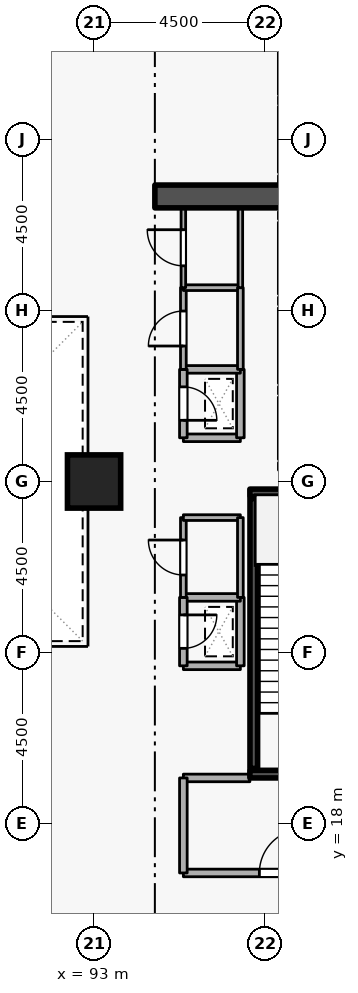
"""IFC4 building model, lengths in metres.
Left out: names, types, materials, properties, quantities, classifications, styles, units other than length and angle.
Written with IfcOpenShell. Run it as: python <this file> out.ifc"""

import sys

from ifc_helpers import new_model, si_unit, direction, frame, frame_2d, origin, origin_2d, place, context, subcontext, project, spatial, rectangle, extrude, element, fill, save


model = new_model("IFC4")
c1 = context("Model", 3, precision=1e-05, world=origin(), true_north=direction((0.0, 1.0)))
c2 = subcontext(c1, "Body", "Model", "MODEL_VIEW")
j1 = project(units=[si_unit("LENGTHUNIT", "METRE"), si_unit("PLANEANGLEUNIT", "RADIAN")], contexts=[c1])
p1 = place(None, origin())
s1 = spatial("IfcSite", under=j1, at=p1, CompositionType="ELEMENT")
p2 = place(p1, origin())
s2 = spatial("IfcBuilding", under=s1, at=p2, CompositionType="ELEMENT")
p3 = place(p2, frame((0.0, 0.0, 4.8)))
s3 = spatial("IfcBuildingStorey", under=s2, at=p3, CompositionType="ELEMENT", Elevation=4.8)
p4 = place(p3, frame((94.6, 34.5, 0.0), z_axis=(0.0, 0.0, 1.0), x_axis=(1.0, 0.0, 0.0)))
e1 = element("IfcWall", 1, at=p4, inside=s3, PredefinedType="SHEAR", context=c2, shape_type="SweptSolid", body=[
    extrude(rectangle(XDim=5.7, YDim=0.6, at=frame_2d((2.85, 0.0))), origin(), (0.0, 0.0, 1.0), 4.8),
])
p5 = place(p3, frame((93.0, 27.0, 0.0), z_axis=(0.0, 0.0, 1.0), x_axis=(1.0, 0.0, 0.0)))
e2 = element("IfcColumn", 2, at=p5, inside=s3, PredefinedType="COLUMN", context=c2, shape_type="SweptSolid", body=[
    extrude(rectangle(XDim=1.4, YDim=1.4, at=origin_2d()), origin(), (0.0, 0.0, 1.0), 4.8),
])
p6 = place(p3, frame((97.95, 29.22, 0.0), z_axis=(0.0, 0.0, 1.0), x_axis=(0.0, -1.0, 0.0)))
e3 = element("IfcWall", 3, at=p6, inside=s3, PredefinedType="STANDARD", context=c2, shape_type="SweptSolid", body=[
    extrude(rectangle(XDim=1.64, YDim=0.2, at=frame_2d((0.82, 0.0))), origin(), (0.0, 0.0, 1.0), 4.46),
])
p7 = place(p6, frame((0.31, 0.0, 0.0)))
e4 = element("IfcOpeningElement", 4, at=p7, cuts=e3, PredefinedType="OPENING", context=c2, shape_type="SweptSolid", body=[
    extrude(rectangle(XDim=1.02, YDim=2.06, at=frame_2d((0.51, 1.03))), frame((0.0, 0.11, 0.0), z_axis=(0.0, -1.0, 0.0), x_axis=(1.0, 0.0, 0.0)), (0.0, 0.0, 1.0), 0.22),
])
p8 = place(p3, frame((97.95, 31.57, 0.0), z_axis=(0.0, 0.0, 1.0), x_axis=(0.0, -1.0, 0.0)))
e5 = element("IfcWall", 5, at=p8, inside=s3, PredefinedType="STANDARD", context=c2, shape_type="SweptSolid", body=[
    extrude(rectangle(XDim=1.99, YDim=0.2, at=frame_2d((0.995, 0.0))), origin(), (0.0, 0.0, 1.0), 4.46),
])
p9 = place(p3, frame((97.95, 33.82, 0.0), z_axis=(0.0, 0.0, 1.0), x_axis=(0.0, -1.0, 0.0)))
e6 = element("IfcWall", 6, at=p9, inside=s3, PredefinedType="STANDARD", context=c2, shape_type="SweptSolid", body=[
    extrude(rectangle(XDim=1.89, YDim=0.2, at=frame_2d((0.945, 0.0))), origin(), (0.0, 0.0, 1.0), 4.46),
])
p10 = place(p9, frame((0.435, 0.0, 0.0)))
e7 = element("IfcOpeningElement", 7, at=p10, cuts=e6, PredefinedType="OPENING", context=c2, shape_type="SweptSolid", body=[
    extrude(rectangle(XDim=1.02, YDim=2.06, at=frame_2d((0.51, 1.03))), frame((0.0, 0.11, 0.0), z_axis=(0.0, -1.0, 0.0), x_axis=(1.0, 0.0, 0.0)), (0.0, 0.0, 1.0), 0.22),
])
p11 = place(p3, frame((97.95, 36.87, 0.0), z_axis=(0.0, 0.0, 1.0), x_axis=(0.0, -1.0, 0.0)))
e8 = element("IfcWall", 8, at=p11, inside=s3, PredefinedType="STANDARD", context=c2, shape_type="SweptSolid", body=[
    extrude(rectangle(XDim=1.74, YDim=0.2, at=frame_2d((0.87, 0.0))), origin(), (0.0, 0.0, 1.0), 4.46),
])
p12 = place(p11, frame((0.36, 0.0, 0.0)))
e9 = element("IfcOpeningElement", 9, at=p12, cuts=e8, PredefinedType="OPENING", context=c2, shape_type="SweptSolid", body=[
    extrude(rectangle(XDim=1.02, YDim=2.06, at=frame_2d((0.51, 1.03))), frame((0.0, 0.11, 0.0), z_axis=(0.0, -1.0, 0.0), x_axis=(1.0, 0.0, 0.0)), (0.0, 0.0, 1.0), 0.22),
])
p13 = place(p3, frame((97.95, 38.97, 0.0), z_axis=(0.0, 0.0, 1.0), x_axis=(0.0, -1.0, 0.0)))
e10 = element("IfcWall", 10, at=p13, inside=s3, PredefinedType="STANDARD", context=c2, shape_type="SweptSolid", body=[
    extrude(rectangle(XDim=1.79, YDim=0.2, at=frame_2d((0.895, 0.0))), origin(), (0.0, 0.0, 1.0), 4.46),
])
p14 = place(p13, frame((0.385, 0.0, 0.0)))
e11 = element("IfcOpeningElement", 11, at=p14, cuts=e10, PredefinedType="OPENING", context=c2, shape_type="SweptSolid", body=[
    extrude(rectangle(XDim=1.02, YDim=2.06, at=frame_2d((0.51, 1.03))), frame((0.0, 0.11, 0.0), z_axis=(0.0, -1.0, 0.0), x_axis=(1.0, 0.0, 0.0)), (0.0, 0.0, 1.0), 0.22),
])
p15 = place(p3, frame((100.45, 19.3, 0.0), z_axis=(0.0, 0.0, 1.0), x_axis=(-1.0, 0.0, 0.0)))
e12 = element("IfcWall", 12, at=p15, inside=s3, PredefinedType="SHEAR", context=c2, shape_type="SweptSolid", body=[
    extrude(rectangle(XDim=3.35, YDim=0.2, at=frame_2d((1.675, 0.0))), origin(), (0.0, 0.0, 1.0), 4.8),
])
p16 = place(p15, frame((1.125, 0.0, 0.0)))
e13 = element("IfcOpeningElement", 13, at=p16, cuts=e12, PredefinedType="OPENING", context=c2, shape_type="SweptSolid", body=[
    extrude(rectangle(XDim=1.1, YDim=2.1, at=frame_2d((0.55, 1.05))), frame((0.0, 0.11, 0.0), z_axis=(0.0, -1.0, 0.0), x_axis=(1.0, 0.0, 0.0)), (0.0, 0.0, 1.0), 0.22),
])
p17 = place(p3, frame((97.1, 26.7, 0.0), z_axis=(0.0, 0.0, 1.0), x_axis=(1.0, 0.0, 0.0)))
e14 = element("IfcWall", 14, at=p17, inside=s3, PredefinedType="SHEAR", context=c2, shape_type="SweptSolid", body=[
    extrude(rectangle(XDim=3.35, YDim=0.2, at=frame_2d((1.675, 0.0))), origin(), (0.0, 0.0, 1.0), 4.8),
])
p18 = place(p3, frame((97.203, 26.55, 0.0), z_axis=(0.0, 0.0, 1.0), x_axis=(0.0, -1.0, 0.0)))
e15 = element("IfcWall", 15, at=p18, inside=s3, PredefinedType="SHEAR", context=c2, shape_type="SweptSolid", body=[
    extrude(rectangle(XDim=7.1, YDim=0.2, at=frame_2d((3.55, 0.0))), origin(), (0.0, 0.0, 1.0), 4.8),
])
p19 = place(p3, frame((95.35, 16.7, 0.0), z_axis=(0.0, 0.0, 1.0), x_axis=(1.0, 0.0, 0.0)))
e16 = element("IfcWall", 16, at=p19, inside=s3, PredefinedType="STANDARD", context=c2, shape_type="SweptSolid", body=[
    extrude(rectangle(XDim=5.15, YDim=0.2, at=frame_2d((2.575, 0.0))), origin(), (0.0, 0.0, 1.0), 4.46),
])
p20 = place(p19, frame((2.0, 0.0, 0.0)))
e17 = element("IfcOpeningElement", 17, at=p20, cuts=e16, PredefinedType="OPENING", context=c2, shape_type="SweptSolid", body=[
    extrude(rectangle(XDim=1.15, YDim=2.1, at=frame_2d((0.575, 1.05))), frame((0.0, 0.11, 0.0), z_axis=(0.0, -1.0, 0.0), x_axis=(1.0, 0.0, 0.0)), (0.0, 0.0, 1.0), 0.22),
])
p21 = place(p3, frame((97.1, 19.2, 0.0), z_axis=(0.0, 0.0, 1.0), x_axis=(-1.0, 0.0, 0.0)))
e18 = element("IfcWall", 18, at=p21, inside=s3, PredefinedType="STANDARD", context=c2, shape_type="SweptSolid", body=[
    extrude(rectangle(XDim=1.75, YDim=0.2, at=frame_2d((0.875, 0.0))), origin(), (0.0, 0.0, 1.0), 3.665),
])
p22 = place(p3, frame((95.35, 19.2, 0.0), z_axis=(0.0, 0.0, 1.0), x_axis=(0.0, -1.0, 0.0)))
e19 = element("IfcWall", 19, at=p22, inside=s3, PredefinedType="STANDARD", context=c2, shape_type="SweptSolid", body=[
    extrude(rectangle(XDim=2.5, YDim=0.2, at=frame_2d((1.25, 0.0))), origin(), (0.0, 0.0, 1.0), 4.46),
])
p23 = place(p3, frame((95.35, 28.15, 0.0), z_axis=(0.0, 0.0, 1.0), x_axis=(1.0, 0.0, 0.0)))
e20 = element("IfcWall", 20, at=p23, inside=s3, PredefinedType="STANDARD", context=c2, shape_type="SweptSolid", body=[
    extrude(rectangle(XDim=1.5, YDim=0.2, at=frame_2d((0.75, 0.0))), origin(), (0.0, 0.0, 1.0), 4.46),
])
p24 = place(p3, frame((96.85, 28.15, 0.0), z_axis=(0.0, 0.0, 1.0), x_axis=(0.0, 1.0, 0.0)))
e21 = element("IfcWall", 21, at=p24, inside=s3, PredefinedType="STANDARD", context=c2, shape_type="SweptSolid", body=[
    extrude(rectangle(XDim=1.8, YDim=0.2, at=frame_2d((0.9, 0.0))), origin(), (0.0, 0.0, 1.0), 4.46),
])
p25 = place(p3, frame((96.85, 29.95, 0.0), z_axis=(0.0, 0.0, 1.0), x_axis=(-1.0, 0.0, 0.0)))
e22 = element("IfcWall", 22, at=p25, inside=s3, PredefinedType="STANDARD", context=c2, shape_type="SweptSolid", body=[
    extrude(rectangle(XDim=1.5, YDim=0.2, at=frame_2d((0.75, 0.0))), origin(), (0.0, 0.0, 1.0), 4.46),
])
p26 = place(p3, frame((95.35, 29.95, 0.0), z_axis=(0.0, 0.0, 1.0), x_axis=(0.0, -1.0, 0.0)))
e23 = element("IfcWall", 23, at=p26, inside=s3, PredefinedType="STANDARD", context=c2, shape_type="SweptSolid", body=[
    extrude(rectangle(XDim=1.8, YDim=0.2, at=frame_2d((0.9, 0.0))), origin(), (0.0, 0.0, 1.0), 4.46),
])
p27 = place(p26, frame((0.46, 0.0, 0.0)))
e24 = element("IfcOpeningElement", 24, at=p27, cuts=e23, PredefinedType="OPENING", context=c2, shape_type="SweptSolid", body=[
    extrude(rectangle(XDim=0.88, YDim=2.04, at=frame_2d((0.44, 1.02))), frame((0.0, 0.11, 0.0), z_axis=(0.0, -1.0, 0.0), x_axis=(1.0, 0.0, 0.0)), (0.0, 0.0, 1.0), 0.22),
])
p28 = place(p3, frame((95.35, 22.15, 0.0), z_axis=(0.0, 0.0, 1.0), x_axis=(1.0, 0.0, 0.0)))
e25 = element("IfcWall", 25, at=p28, inside=s3, PredefinedType="STANDARD", context=c2, shape_type="SweptSolid", body=[
    extrude(rectangle(XDim=1.5, YDim=0.2, at=frame_2d((0.75, 0.0))), origin(), (0.0, 0.0, 1.0), 4.46),
])
p29 = place(p3, frame((96.85, 22.15, 0.0), z_axis=(0.0, 0.0, 1.0), x_axis=(0.0, 1.0, 0.0)))
e26 = element("IfcWall", 26, at=p29, inside=s3, PredefinedType="STANDARD", context=c2, shape_type="SweptSolid", body=[
    extrude(rectangle(XDim=1.8, YDim=0.2, at=frame_2d((0.9, 0.0))), origin(), (0.0, 0.0, 1.0), 4.46),
])
p30 = place(p3, frame((96.85, 23.95, 0.0), z_axis=(0.0, 0.0, 1.0), x_axis=(-1.0, 0.0, 0.0)))
e27 = element("IfcWall", 27, at=p30, inside=s3, PredefinedType="STANDARD", context=c2, shape_type="SweptSolid", body=[
    extrude(rectangle(XDim=1.5, YDim=0.2, at=frame_2d((0.75, 0.0))), origin(), (0.0, 0.0, 1.0), 4.46),
])
p31 = place(p3, frame((95.35, 23.95, 0.0), z_axis=(0.0, 0.0, 1.0), x_axis=(0.0, -1.0, 0.0)))
e28 = element("IfcWall", 28, at=p31, inside=s3, PredefinedType="STANDARD", context=c2, shape_type="SweptSolid", body=[
    extrude(rectangle(XDim=1.8, YDim=0.2, at=frame_2d((0.9, 0.0))), origin(), (0.0, 0.0, 1.0), 4.46),
])
p32 = place(p31, frame((0.46, 0.0, 0.0)))
e29 = element("IfcOpeningElement", 29, at=p32, cuts=e28, PredefinedType="OPENING", context=c2, shape_type="SweptSolid", body=[
    extrude(rectangle(XDim=0.88, YDim=2.04, at=frame_2d((0.44, 1.02))), frame((0.0, 0.11, 0.0), z_axis=(0.0, -1.0, 0.0), x_axis=(1.0, 0.0, 0.0)), (0.0, 0.0, 1.0), 0.22),
])
p33 = place(p3, frame((95.35, 23.95, 0.0), z_axis=(0.0, 0.0, 1.0), x_axis=(0.0, 1.0, 0.0)))
e30 = element("IfcWall", 30, at=p33, inside=s3, PredefinedType="PARTITIONING", context=c2, shape_type="SweptSolid", body=[
    extrude(rectangle(XDim=2.1, YDim=0.15, at=frame_2d((1.05, 0.0))), origin(), (0.0, 0.0, 1.0), 4.46),
])
p34 = place(p33, frame((0.59, 0.0, 0.0)))
e31 = element("IfcOpeningElement", 31, at=p34, cuts=e30, PredefinedType="OPENING", context=c2, shape_type="SweptSolid", body=[
    extrude(rectangle(XDim=0.92, YDim=2.08, at=frame_2d((0.46, 1.04))), frame((0.0, 0.085, 0.0), z_axis=(0.0, -1.0, 0.0), x_axis=(1.0, 0.0, 0.0)), (0.0, 0.0, 1.0), 0.17),
])
p35 = place(p3, frame((95.35, 26.05, 0.0), z_axis=(0.0, 0.0, 1.0), x_axis=(1.0, 0.0, 0.0)))
e32 = element("IfcWall", 32, at=p35, inside=s3, PredefinedType="PARTITIONING", context=c2, shape_type="SweptSolid", body=[
    extrude(rectangle(XDim=1.5, YDim=0.15, at=frame_2d((0.75, 0.0))), origin(), (0.0, 0.0, 1.0), 4.46),
])
p36 = place(p3, frame((96.85, 26.05, 0.0), z_axis=(0.0, 0.0, 1.0), x_axis=(0.0, -1.0, 0.0)))
e33 = element("IfcWall", 33, at=p36, inside=s3, PredefinedType="PARTITIONING", context=c2, shape_type="SweptSolid", body=[
    extrude(rectangle(XDim=2.1, YDim=0.15, at=frame_2d((1.05, 0.0))), origin(), (0.0, 0.0, 1.0), 4.46),
])
p37 = place(p3, frame((95.35, 29.95, 0.0), z_axis=(0.0, 0.0, 1.0), x_axis=(0.0, 1.0, 0.0)))
e34 = element("IfcWall", 34, at=p37, inside=s3, PredefinedType="PARTITIONING", context=c2, shape_type="SweptSolid", body=[
    extrude(rectangle(XDim=2.15, YDim=0.15, at=frame_2d((1.075, 0.0))), origin(), (0.0, 0.0, 1.0), 4.46),
])
p38 = place(p37, frame((0.615, 0.0, 0.0)))
e35 = element("IfcOpeningElement", 35, at=p38, cuts=e34, PredefinedType="OPENING", context=c2, shape_type="SweptSolid", body=[
    extrude(rectangle(XDim=0.92, YDim=2.08, at=frame_2d((0.46, 1.04))), frame((0.0, 0.085, 0.0), z_axis=(0.0, -1.0, 0.0), x_axis=(1.0, 0.0, 0.0)), (0.0, 0.0, 1.0), 0.17),
])
p39 = place(p3, frame((95.35, 32.1, 0.0), z_axis=(0.0, 0.0, 1.0), x_axis=(1.0, 0.0, 0.0)))
e36 = element("IfcWall", 36, at=p39, inside=s3, PredefinedType="PARTITIONING", context=c2, shape_type="SweptSolid", body=[
    extrude(rectangle(XDim=1.5, YDim=0.15, at=frame_2d((0.75, 0.0))), origin(), (0.0, 0.0, 1.0), 4.46),
])
p40 = place(p3, frame((96.85, 32.1, 0.0), z_axis=(0.0, 0.0, 1.0), x_axis=(0.0, -1.0, 0.0)))
e37 = element("IfcWall", 37, at=p40, inside=s3, PredefinedType="PARTITIONING", context=c2, shape_type="SweptSolid", body=[
    extrude(rectangle(XDim=2.15, YDim=0.15, at=frame_2d((1.075, 0.0))), origin(), (0.0, 0.0, 1.0), 4.46),
])
p41 = place(p3, frame((95.35, 32.1, 0.0), z_axis=(0.0, 0.0, 1.0), x_axis=(0.0, 1.0, 0.0)))
e38 = element("IfcWall", 38, at=p41, inside=s3, PredefinedType="PARTITIONING", context=c2, shape_type="SweptSolid", body=[
    extrude(rectangle(XDim=2.1, YDim=0.12, at=frame_2d((1.05, 0.0))), origin(), (0.0, 0.0, 1.0), 4.46),
])
p42 = place(p41, frame((0.575, 0.0, 0.0)))
e39 = element("IfcOpeningElement", 39, at=p42, cuts=e38, PredefinedType="OPENING", context=c2, shape_type="SweptSolid", body=[
    extrude(rectangle(XDim=0.95, YDim=2.1, at=frame_2d((0.475, 1.05))), frame((0.0, 0.07, 0.0), z_axis=(0.0, -1.0, 0.0), x_axis=(1.0, 0.0, 0.0)), (0.0, 0.0, 1.0), 0.14),
])
p43 = place(p3, frame((96.85, 34.2, 0.0), z_axis=(0.0, 0.0, 1.0), x_axis=(0.0, -1.0, 0.0)))
e40 = element("IfcWall", 40, at=p43, inside=s3, PredefinedType="PARTITIONING", context=c2, shape_type="SweptSolid", body=[
    extrude(rectangle(XDim=2.1, YDim=0.12, at=frame_2d((1.05, 0.0))), origin(), (0.0, 0.0, 1.0), 4.46),
])
p44 = place(p20, origin())
e41 = element("IfcDoor", 41, at=p44, inside=s3, OperationType="SINGLE_SWING_RIGHT", PredefinedType="DOOR", context=c2, shape_type="SweptSolid", body=[
    extrude(rectangle(XDim=1.15, YDim=2.1, at=frame_2d((0.575, 1.05))), frame((0.0, 0.025, 0.0), z_axis=(0.0, -1.0, 0.0), x_axis=(1.0, 0.0, 0.0)), (0.0, 0.0, 1.0), 0.05),
])
fill(e17, e41)
p45 = place(p27, origin())
e42 = element("IfcDoor", 42, at=p45, inside=s3, OperationType="SINGLE_SWING_RIGHT", PredefinedType="DOOR", context=c2, shape_type="SweptSolid", body=[
    extrude(rectangle(XDim=0.88, YDim=2.04, at=frame_2d((0.44, 1.02))), frame((0.0, 0.025, 0.0), z_axis=(0.0, -1.0, 0.0), x_axis=(1.0, 0.0, 0.0)), (0.0, 0.0, 1.0), 0.05),
])
fill(e24, e42)
p46 = place(p32, origin())
e43 = element("IfcDoor", 43, at=p46, inside=s3, OperationType="SINGLE_SWING_LEFT", PredefinedType="DOOR", context=c2, shape_type="SweptSolid", body=[
    extrude(rectangle(XDim=0.88, YDim=2.04, at=frame_2d((0.44, 1.02))), frame((0.0, 0.025, 0.0), z_axis=(0.0, -1.0, 0.0), x_axis=(1.0, 0.0, 0.0)), (0.0, 0.0, 1.0), 0.05),
])
fill(e29, e43)
p47 = place(p34, origin())
e44 = element("IfcDoor", 44, at=p47, inside=s3, OperationType="SINGLE_SWING_RIGHT", PredefinedType="DOOR", context=c2, shape_type="SweptSolid", body=[
    extrude(rectangle(XDim=0.92, YDim=2.08, at=frame_2d((0.46, 1.04))), frame((0.0, 0.025, 0.0), z_axis=(0.0, -1.0, 0.0), x_axis=(1.0, 0.0, 0.0)), (0.0, 0.0, 1.0), 0.05),
])
fill(e31, e44)
p48 = place(p38, origin())
e45 = element("IfcDoor", 45, at=p48, inside=s3, OperationType="SINGLE_SWING_LEFT", PredefinedType="DOOR", context=c2, shape_type="SweptSolid", body=[
    extrude(rectangle(XDim=0.92, YDim=2.08, at=frame_2d((0.46, 1.04))), frame((0.0, 0.025, 0.0), z_axis=(0.0, -1.0, 0.0), x_axis=(1.0, 0.0, 0.0)), (0.0, 0.0, 1.0), 0.05),
])
fill(e35, e45)
p49 = place(p42, origin())
e46 = element("IfcDoor", 46, at=p49, inside=s3, OperationType="SINGLE_SWING_RIGHT", PredefinedType="DOOR", context=c2, shape_type="SweptSolid", body=[
    extrude(rectangle(XDim=0.95, YDim=2.1, at=frame_2d((0.475, 1.05))), frame((0.0, 0.025, 0.0), z_axis=(0.0, -1.0, 0.0), x_axis=(1.0, 0.0, 0.0)), (0.0, 0.0, 1.0), 0.05),
])
fill(e39, e46)
save(model, sys.argv[1])
